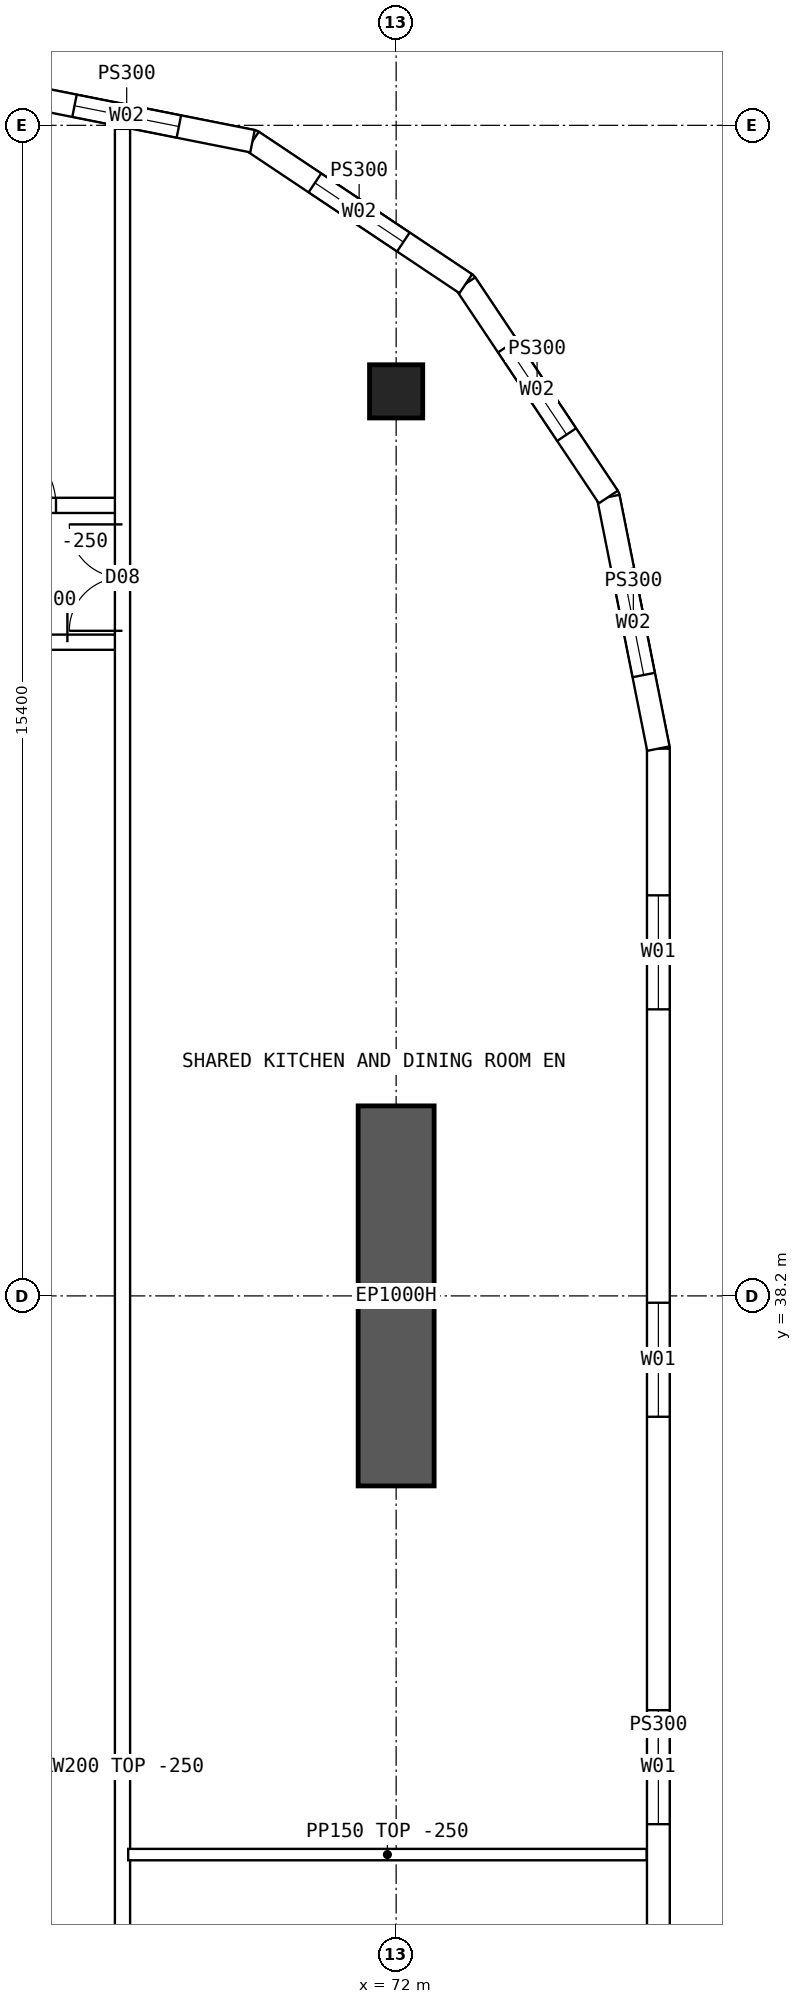
"""IFC4 building model, lengths in metres.
Left out: names, types, materials, properties, quantities, classifications, styles, units other than length and angle.
Written with IfcOpenShell. Run it as: python <this file> out.ifc"""

import sys

from ifc_helpers import new_model, si_unit, direction, frame, frame_2d, origin, origin_2d, place, context, subcontext, project, spatial, polyline, rectangle, hollow_rectangle, outline, extrude, element, fill, save


model = new_model("IFC4")
c1 = context("Model", 3, precision=1e-05, world=origin(), true_north=direction((0.0, 1.0)))
c2 = subcontext(c1, "Body", "Model", "MODEL_VIEW")
j1 = project(units=[si_unit("LENGTHUNIT", "METRE"), si_unit("PLANEANGLEUNIT", "RADIAN")], contexts=[c1])
p1 = place(None, origin())
s1 = spatial("IfcSite", under=j1, at=p1, CompositionType="ELEMENT")
p2 = place(p1, origin())
s2 = spatial("IfcBuilding", under=s1, at=p2, CompositionType="ELEMENT")
p3 = place(p2, frame((0.0, 0.0, 186.1)))
s3 = spatial("IfcBuildingStorey", under=s2, at=p3, CompositionType="ELEMENT", Elevation=186.1)
p4 = place(p3, frame((72.0, 50.1, 0.0), z_axis=(0.0, 0.0, 1.0), x_axis=(1.0, 0.0, 0.0)))
e1 = element("IfcColumn", 1, at=p4, inside=s3, PredefinedType="COLUMN", context=c2, shape_type="SweptSolid", body=[
    extrude(hollow_rectangle(XDim=0.7, YDim=0.7, WallThickness=0.07, at=origin_2d()), origin(), (0.0, 0.0, 1.0), 3.75),
])
p5 = place(p3, frame((72.0, 35.7, 0.0), z_axis=(0.0, 0.0, 1.0), x_axis=(0.0, 1.0, 0.0)))
e2 = element("IfcWall", 2, at=p5, inside=s3, PredefinedType="SHEAR", context=c2, shape_type="SweptSolid", body=[
    extrude(rectangle(XDim=5.0, YDim=1.0, at=frame_2d((2.5, 0.0))), origin(), (0.0, 0.0, 1.0), 3.75),
])
p6 = place(p3, frame((75.45, 18.6, 0.0), z_axis=(0.0, 0.0, 1.0), x_axis=(0.0, 1.0, 0.0)))
e3 = element("IfcWall", 3, at=p6, inside=s3, PredefinedType="SOLIDWALL", context=c2, shape_type="SweptSolid", body=[
    extrude(outline(polyline([(-0.015, -0.15), (26.815, -0.15), (26.785, 0.15), (0.015, 0.15), (-0.015, -0.15)])), origin(), (0.0, 0.0, 1.0), 3.5),
])
p7 = place(p6, frame((1.93, 0.0, 0.9)))
e4 = element("IfcOpeningElement", 4, at=p7, cuts=e3, PredefinedType="OPENING", context=c2, shape_type="SweptSolid", body=[
    extrude(rectangle(XDim=1.5, YDim=2.0, at=frame_2d((0.75, 1.0))), frame((0.0, 0.16, 0.0), z_axis=(0.0, -1.0, 0.0), x_axis=(1.0, 0.0, 0.0)), (0.0, 0.0, 1.0), 0.32),
])
p8 = place(p6, frame((7.29, 0.0, 0.9)))
e5 = element("IfcOpeningElement", 5, at=p8, cuts=e3, PredefinedType="OPENING", context=c2, shape_type="SweptSolid", body=[
    extrude(rectangle(XDim=1.5, YDim=2.0, at=frame_2d((0.75, 1.0))), frame((0.0, 0.16, 0.0), z_axis=(0.0, -1.0, 0.0), x_axis=(1.0, 0.0, 0.0)), (0.0, 0.0, 1.0), 0.32),
])
p9 = place(p6, frame((12.65, 0.0, 0.9)))
e6 = element("IfcOpeningElement", 6, at=p9, cuts=e3, PredefinedType="OPENING", context=c2, shape_type="SweptSolid", body=[
    extrude(rectangle(XDim=1.5, YDim=2.0, at=frame_2d((0.75, 1.0))), frame((0.0, 0.16, 0.0), z_axis=(0.0, -1.0, 0.0), x_axis=(1.0, 0.0, 0.0)), (0.0, 0.0, 1.0), 0.32),
])
p10 = place(p6, frame((18.01, 0.0, 0.9)))
e7 = element("IfcOpeningElement", 7, at=p10, cuts=e3, PredefinedType="OPENING", context=c2, shape_type="SweptSolid", body=[
    extrude(rectangle(XDim=1.5, YDim=2.0, at=frame_2d((0.75, 1.0))), frame((0.0, 0.16, 0.0), z_axis=(0.0, -1.0, 0.0), x_axis=(1.0, 0.0, 0.0)), (0.0, 0.0, 1.0), 0.32),
])
p11 = place(p6, frame((23.37, 0.0, 0.9)))
e8 = element("IfcOpeningElement", 8, at=p11, cuts=e3, PredefinedType="OPENING", context=c2, shape_type="SweptSolid", body=[
    extrude(rectangle(XDim=1.5, YDim=2.0, at=frame_2d((0.75, 1.0))), frame((0.0, 0.16, 0.0), z_axis=(0.0, -1.0, 0.0), x_axis=(1.0, 0.0, 0.0)), (0.0, 0.0, 1.0), 0.32),
])
p12 = place(p3, frame((75.45, 45.4, 0.0), z_axis=(0.0, 0.0, 1.0), x_axis=(-0.19508664885, 0.980786011034, 0.0)))
e9 = element("IfcWall", 9, at=p12, inside=s3, PredefinedType="SOLIDWALL", context=c2, shape_type="SweptSolid", body=[
    extrude(outline(polyline([(-0.015, -0.15), (3.405, -0.15), (3.345, 0.15), (0.015, 0.15), (-0.015, -0.15)])), origin(), (0.0, 0.0, 1.0), 3.5),
])
p13 = place(p12, frame((0.988, 0.0, 0.9)))
e10 = element("IfcOpeningElement", 10, at=p13, cuts=e9, PredefinedType="OPENING", context=c2, shape_type="SweptSolid", body=[
    extrude(rectangle(XDim=1.4, YDim=1.8, at=frame_2d((0.7, 0.9))), frame((0.0, 0.16, 0.0), z_axis=(0.0, -1.0, 0.0), x_axis=(1.0, 0.0, 0.0)), (0.0, 0.0, 1.0), 0.32),
])
p14 = place(p3, frame((74.792, 48.71, 0.0), z_axis=(0.0, 0.0, 1.0), x_axis=(-0.555534554399, 0.831493450887, 0.0)))
e11 = element("IfcWall", 11, at=p14, inside=s3, PredefinedType="SOLIDWALL", context=c2, shape_type="SweptSolid", body=[
    extrude(outline(polyline([(-0.03, -0.15), (3.405, -0.15), (3.345, 0.15), (0.03, 0.15), (-0.03, -0.15)])), origin(), (0.0, 0.0, 1.0), 3.5),
])
p15 = place(p14, frame((0.988, 0.0, 0.9)))
e12 = element("IfcOpeningElement", 12, at=p15, cuts=e11, PredefinedType="OPENING", context=c2, shape_type="SweptSolid", body=[
    extrude(rectangle(XDim=1.4, YDim=1.8, at=frame_2d((0.7, 0.9))), frame((0.0, 0.16, 0.0), z_axis=(0.0, -1.0, 0.0), x_axis=(1.0, 0.0, 0.0)), (0.0, 0.0, 1.0), 0.32),
])
p16 = place(p3, frame((72.917, 51.517, 0.0), z_axis=(0.0, 0.0, 1.0), x_axis=(-0.831493450887, 0.555534554399, 0.0)))
e13 = element("IfcWall", 13, at=p16, inside=s3, PredefinedType="SOLIDWALL", context=c2, shape_type="SweptSolid", body=[
    extrude(outline(polyline([(-0.03, -0.15), (3.405, -0.15), (3.345, 0.15), (0.03, 0.15), (-0.03, -0.15)])), origin(), (0.0, 0.0, 1.0), 3.5),
])
p17 = place(p16, frame((0.988, 0.0, 0.9)))
e14 = element("IfcOpeningElement", 14, at=p17, cuts=e13, PredefinedType="OPENING", context=c2, shape_type="SweptSolid", body=[
    extrude(rectangle(XDim=1.4, YDim=1.8, at=frame_2d((0.7, 0.9))), frame((0.0, 0.16, 0.0), z_axis=(0.0, -1.0, 0.0), x_axis=(1.0, 0.0, 0.0)), (0.0, 0.0, 1.0), 0.32),
])
p18 = place(p3, frame((70.11, 53.392, 0.0), z_axis=(0.0, 0.0, 1.0), x_axis=(-0.98078325777, 0.195100490205, 0.0)))
e15 = element("IfcWall", 15, at=p18, inside=s3, PredefinedType="SOLIDWALL", context=c2, shape_type="SweptSolid", body=[
    extrude(outline(polyline([(-0.03, -0.15), (3.405, -0.15), (3.345, 0.15), (0.03, 0.15), (-0.03, -0.15)])), origin(), (0.0, 0.0, 1.0), 3.5),
])
p19 = place(p18, frame((0.988, 0.0, 0.9)))
e16 = element("IfcOpeningElement", 16, at=p19, cuts=e15, PredefinedType="OPENING", context=c2, shape_type="SweptSolid", body=[
    extrude(rectangle(XDim=1.4, YDim=1.8, at=frame_2d((0.7, 0.9))), frame((0.0, 0.16, 0.0), z_axis=(0.0, -1.0, 0.0), x_axis=(1.0, 0.0, 0.0)), (0.0, 0.0, 1.0), 0.32),
])
p20 = place(p3, frame((66.425, 48.6, 0.0), z_axis=(0.0, 0.0, 1.0), x_axis=(1.0, 0.0, 0.0)))
e17 = element("IfcWall", 17, at=p20, inside=s3, PredefinedType="SOLIDWALL", context=c2, shape_type="SweptSolid", body=[
    extrude(rectangle(XDim=1.975, YDim=0.2, at=frame_2d((0.987, 0.0))), origin(), (0.0, 0.0, 1.0), 3.5),
])
p21 = place(p20, frame((0.2, 0.0, 0.0)))
e18 = element("IfcOpeningElement", 18, at=p21, cuts=e17, PredefinedType="OPENING", context=c2, shape_type="SweptSolid", body=[
    extrude(rectangle(XDim=0.9, YDim=2.1, at=frame_2d((0.45, 1.05))), frame((0.0, 0.11, 0.0), z_axis=(0.0, -1.0, 0.0), x_axis=(1.0, 0.0, 0.0)), (0.0, 0.0, 1.0), 0.22),
])
p22 = place(p3, frame((66.425, 46.8, 0.0), z_axis=(0.0, 0.0, 1.0), x_axis=(1.0, 0.0, 0.0)))
e19 = element("IfcWall", 19, at=p22, inside=s3, PredefinedType="SOLIDWALL", context=c2, shape_type="SweptSolid", body=[
    extrude(rectangle(XDim=1.975, YDim=0.2, at=frame_2d((0.987, 0.0))), origin(), (0.0, 0.0, 1.0), 3.5),
])
p23 = place(p22, frame((0.05, 0.0, 0.0)))
e20 = element("IfcOpeningElement", 20, at=p23, cuts=e19, PredefinedType="OPENING", context=c2, shape_type="SweptSolid", body=[
    extrude(rectangle(XDim=1.2, YDim=2.1, at=frame_2d((0.6, 1.05))), frame((0.0, 0.11, 0.0), z_axis=(0.0, -1.0, 0.0), x_axis=(1.0, 0.0, 0.0)), (0.0, 0.0, 1.0), 0.22),
])
p24 = place(p3, frame((68.475, 30.85, 0.0), z_axis=(0.0, 0.0, 1.0), x_axis=(1.0, 0.0, 0.0)))
e21 = element("IfcWall", 21, at=p24, inside=s3, PredefinedType="PARTITIONING", context=c2, shape_type="SweptSolid", body=[
    extrude(outline(polyline([(0.0, 0.0), (6.82, 0.0), (6.82, 3.5), (3.827, 3.5), (3.825, 3.05), (3.227, 3.05), (3.225, 3.5), (0.0, 3.5), (0.0, 0.0)])), frame((0.0, 0.075, 0.0), z_axis=(0.0, -1.0, 0.0), x_axis=(1.0, 0.0, 0.0)), (0.0, 0.0, 1.0), 0.15),
])
p25 = place(p3, frame((68.4, 10.446, 0.0), z_axis=(0.0, 0.0, 1.0), x_axis=(0.0, 1.0, 0.0)))
e22 = element("IfcWall", 22, at=p25, inside=s3, PredefinedType="SOLIDWALL", context=c2, shape_type="SweptSolid", body=[
    extrude(rectangle(XDim=43.107, YDim=0.2, at=frame_2d((21.554, 0.0))), origin(), (0.0, 0.0, 1.0), 3.5),
])
p26 = place(p25, frame((5.104, 0.0, 0.0)))
e23 = element("IfcOpeningElement", 23, at=p26, cuts=e22, PredefinedType="OPENING", context=c2, shape_type="SweptSolid", body=[
    extrude(rectangle(XDim=1.4, YDim=2.1, at=frame_2d((0.7, 1.05))), frame((0.0, 0.11, 0.0), z_axis=(0.0, -1.0, 0.0), x_axis=(1.0, 0.0, 0.0)), (0.0, 0.0, 1.0), 0.22),
])
p27 = place(p25, frame((36.504, 0.0, 0.0)))
e24 = element("IfcOpeningElement", 24, at=p27, cuts=e22, PredefinedType="OPENING", context=c2, shape_type="SweptSolid", body=[
    extrude(rectangle(XDim=1.4, YDim=2.1, at=frame_2d((0.7, 1.05))), frame((0.0, 0.11, 0.0), z_axis=(0.0, -1.0, 0.0), x_axis=(1.0, 0.0, 0.0)), (0.0, 0.0, 1.0), 0.22),
])
p28 = place(p9, origin())
e25 = element("IfcWindow", 25, at=p28, inside=s3, PartitioningType="SINGLE_PANEL", PredefinedType="WINDOW", context=c2, shape_type="SweptSolid", body=[
    extrude(rectangle(XDim=1.5, YDim=2.0, at=frame_2d((0.75, 1.0))), frame((0.0, 0.03, 0.0), z_axis=(0.0, -1.0, 0.0), x_axis=(1.0, 0.0, 0.0)), (0.0, 0.0, 1.0), 0.06),
])
fill(e6, e25)
p29 = place(p10, origin())
e26 = element("IfcWindow", 26, at=p29, inside=s3, PartitioningType="SINGLE_PANEL", PredefinedType="WINDOW", context=c2, shape_type="SweptSolid", body=[
    extrude(rectangle(XDim=1.5, YDim=2.0, at=frame_2d((0.75, 1.0))), frame((0.0, 0.03, 0.0), z_axis=(0.0, -1.0, 0.0), x_axis=(1.0, 0.0, 0.0)), (0.0, 0.0, 1.0), 0.06),
])
fill(e7, e26)
p30 = place(p11, origin())
e27 = element("IfcWindow", 27, at=p30, inside=s3, PartitioningType="SINGLE_PANEL", PredefinedType="WINDOW", context=c2, shape_type="SweptSolid", body=[
    extrude(rectangle(XDim=1.5, YDim=2.0, at=frame_2d((0.75, 1.0))), frame((0.0, 0.03, 0.0), z_axis=(0.0, -1.0, 0.0), x_axis=(1.0, 0.0, 0.0)), (0.0, 0.0, 1.0), 0.06),
])
fill(e8, e27)
p31 = place(p13, origin())
e28 = element("IfcWindow", 28, at=p31, inside=s3, PartitioningType="SINGLE_PANEL", PredefinedType="WINDOW", context=c2, shape_type="SweptSolid", body=[
    extrude(rectangle(XDim=1.4, YDim=1.8, at=frame_2d((0.7, 0.9))), frame((0.0, 0.03, 0.0), z_axis=(0.0, -1.0, 0.0), x_axis=(1.0, 0.0, 0.0)), (0.0, 0.0, 1.0), 0.06),
])
fill(e10, e28)
p32 = place(p15, origin())
e29 = element("IfcWindow", 29, at=p32, inside=s3, PartitioningType="SINGLE_PANEL", PredefinedType="WINDOW", context=c2, shape_type="SweptSolid", body=[
    extrude(rectangle(XDim=1.4, YDim=1.8, at=frame_2d((0.7, 0.9))), frame((0.0, 0.03, 0.0), z_axis=(0.0, -1.0, 0.0), x_axis=(1.0, 0.0, 0.0)), (0.0, 0.0, 1.0), 0.06),
])
fill(e12, e29)
p33 = place(p17, origin())
e30 = element("IfcWindow", 30, at=p33, inside=s3, PartitioningType="SINGLE_PANEL", PredefinedType="WINDOW", context=c2, shape_type="SweptSolid", body=[
    extrude(rectangle(XDim=1.4, YDim=1.8, at=frame_2d((0.7, 0.9))), frame((0.0, 0.03, 0.0), z_axis=(0.0, -1.0, 0.0), x_axis=(1.0, 0.0, 0.0)), (0.0, 0.0, 1.0), 0.06),
])
fill(e14, e30)
p34 = place(p19, origin())
e31 = element("IfcWindow", 31, at=p34, inside=s3, PartitioningType="SINGLE_PANEL", PredefinedType="WINDOW", context=c2, shape_type="SweptSolid", body=[
    extrude(rectangle(XDim=1.4, YDim=1.8, at=frame_2d((0.7, 0.9))), frame((0.0, 0.03, 0.0), z_axis=(0.0, -1.0, 0.0), x_axis=(1.0, 0.0, 0.0)), (0.0, 0.0, 1.0), 0.06),
])
fill(e16, e31)
p35 = place(p23, origin())
e32 = element("IfcDoor", 32, at=p35, inside=s3, OperationType="DOUBLE_DOOR_SINGLE_SWING", PredefinedType="DOOR", context=c2, shape_type="SweptSolid", body=[
    extrude(rectangle(XDim=1.2, YDim=2.1, at=frame_2d((0.6, 1.05))), frame((0.0, 0.025, 0.0), z_axis=(0.0, -1.0, 0.0), x_axis=(1.0, 0.0, 0.0)), (0.0, 0.0, 1.0), 0.05),
])
fill(e20, e32)
p36 = place(p27, origin())
e33 = element("IfcDoor", 33, at=p36, inside=s3, OperationType="DOUBLE_DOOR_SINGLE_SWING", PredefinedType="DOOR", context=c2, shape_type="SweptSolid", body=[
    extrude(rectangle(XDim=1.4, YDim=2.1, at=frame_2d((0.7, 1.05))), frame((0.0, 0.025, 0.0), z_axis=(0.0, -1.0, 0.0), x_axis=(1.0, 0.0, 0.0)), (0.0, 0.0, 1.0), 0.05),
])
fill(e24, e33)
p37 = place(p21, origin())
e34 = element("IfcDoor", 34, at=p37, inside=s3, OperationType="SINGLE_SWING_LEFT", PredefinedType="DOOR", context=c2, shape_type="SweptSolid", body=[
    extrude(rectangle(XDim=0.9, YDim=2.1, at=frame_2d((0.45, 1.05))), frame((0.0, 0.025, 0.0), z_axis=(0.0, -1.0, 0.0), x_axis=(1.0, 0.0, 0.0)), (0.0, 0.0, 1.0), 0.05),
])
fill(e18, e34)
save(model, sys.argv[1])
